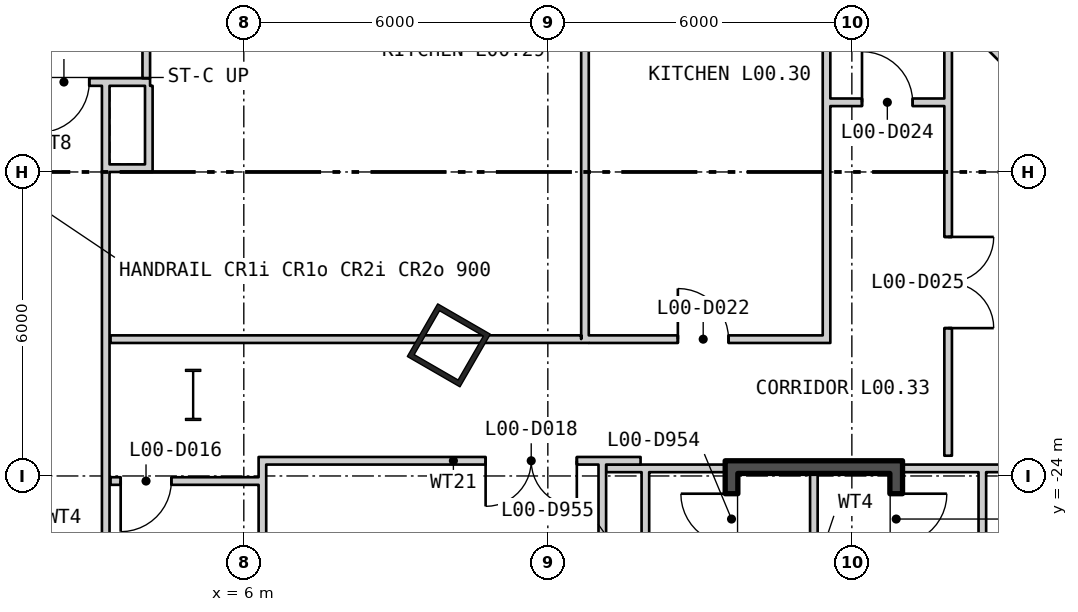
"""IFC4 building model, lengths in metres.
Left out: names, types, materials, properties, quantities, classifications, styles, units other than length and angle.
Written with IfcOpenShell. Run it as: python <this file> out.ifc"""

import sys

from ifc_helpers import new_model, si_unit, direction, frame, frame_2d, origin, origin_2d, place, context, subcontext, project, spatial, rectangle, hollow_rectangle, i_section, extrude, element, fill, save


model = new_model("IFC4")
c1 = context("Model", 3, precision=1e-05, world=origin(), true_north=direction((0.0, 1.0)))
c2 = subcontext(c1, "Body", "Model", "MODEL_VIEW")
j1 = project(units=[si_unit("LENGTHUNIT", "METRE"), si_unit("PLANEANGLEUNIT", "RADIAN")], contexts=[c1])
p1 = place(None, origin())
s1 = spatial("IfcSite", under=j1, at=p1, CompositionType="ELEMENT")
p2 = place(p1, origin())
s2 = spatial("IfcBuilding", under=s1, at=p2, CompositionType="ELEMENT")
p3 = place(p2, origin())
s3 = spatial("IfcBuildingStorey", under=s2, at=p3, CompositionType="ELEMENT", Elevation=0.0)
p4 = place(p3, frame((10.046, -21.422, 0.0), z_axis=(0.0, 0.0, 1.0), x_axis=(0.5, 0.866025403784, 0.0)))
e1 = element("IfcColumn", 1, at=p4, inside=s3, PredefinedType="COLUMN", context=c2, shape_type="SweptSolid", body=[
    extrude(hollow_rectangle(XDim=1.2, YDim=1.2, WallThickness=0.1, at=origin_2d()), origin(), (0.0, 0.0, 1.0), 8.4),
])
p5 = place(p3, frame((5.0, -22.4, 0.0), z_axis=(0.0, 0.0, 1.0), x_axis=(1.0, 0.0, 0.0)))
e2 = element("IfcColumn", 2, at=p5, inside=s3, PredefinedType="COLUMN", context=c2, shape_type="SweptSolid", body=[
    extrude(i_section(OverallWidth=0.302, OverallDepth=1.008, WebThickness=0.021, FlangeThickness=0.04, at=origin_2d()), origin(), (0.0, 0.0, 1.0), 8.4),
])
p6 = place(p3, frame((1.55, -16.225, 0.0), z_axis=(0.0, 0.0, 1.0), x_axis=(1.0, 0.0, 0.0)))
e3 = element("IfcWall", 3, at=p6, inside=s3, PredefinedType="PARTITIONING", context=c2, shape_type="SweptSolid", body=[
    extrude(rectangle(XDim=2.6, YDim=0.15, at=frame_2d((1.3, 0.0))), origin(), (0.0, 0.0, 1.0), 8.18),
])
p7 = place(p6, frame((0.4, 0.0, 0.0)))
e4 = element("IfcOpeningElement", 4, at=p7, cuts=e3, PredefinedType="OPENING", context=c2, shape_type="SweptSolid", body=[
    extrude(rectangle(XDim=1.0, YDim=2.4, at=frame_2d((0.5, 1.2))), frame((0.0, 0.085, 0.0), z_axis=(0.0, -1.0, 0.0), x_axis=(1.0, 0.0, 0.0)), (0.0, 0.0, 1.0), 0.17),
])
p8 = place(p3, frame((4.075, -16.15, 0.0), z_axis=(0.0, 0.0, 1.0), x_axis=(0.0, 1.0, 0.0)))
e5 = element("IfcWall", 5, at=p8, inside=s3, PredefinedType="PARTITIONING", context=c2, shape_type="SweptSolid", body=[
    extrude(rectangle(XDim=2.4, YDim=0.15, at=frame_2d((1.2, 0.0))), origin(), (0.0, 0.0, 1.0), 8.18),
])
p9 = place(p3, frame((3.35, -17.925, 0.0), z_axis=(0.0, 0.0, 1.0), x_axis=(1.0, 0.0, 0.0)))
e6 = element("IfcWall", 6, at=p9, inside=s3, PredefinedType="PARTITIONING", context=c2, shape_type="SweptSolid", body=[
    extrude(rectangle(XDim=0.7, YDim=0.15, at=frame_2d((0.35, 0.0))), origin(), (0.0, 0.0, 1.0), 8.18),
])
p10 = place(p3, frame((4.125, -18.0, 0.0), z_axis=(0.0, 0.0, 1.0), x_axis=(0.0, 1.0, 0.0)))
e7 = element("IfcWall", 7, at=p10, inside=s3, PredefinedType="PARTITIONING", context=c2, shape_type="SweptSolid", body=[
    extrude(rectangle(XDim=1.7, YDim=0.15, at=frame_2d((0.85, 0.0))), origin(), (0.0, 0.0, 1.0), 8.18),
])
p11 = place(p3, frame((3.275, -32.9, 0.0), z_axis=(0.0, 0.0, 1.0), x_axis=(0.0, 1.0, 0.0)))
e8 = element("IfcWall", 8, at=p11, inside=s3, PredefinedType="PARTITIONING", context=c2, shape_type="SweptSolid", body=[
    extrude(rectangle(XDim=16.6, YDim=0.15, at=frame_2d((8.3, 0.0))), origin(), (0.0, 0.0, 1.0), 7.58),
])
p12 = place(p3, frame((15.625, -31.25, 0.0), z_axis=(0.0, 0.0, 1.0), x_axis=(0.0, 1.0, 0.0)))
e9 = element("IfcWall", 9, at=p12, inside=s3, PredefinedType="SHEAR", context=c2, shape_type="SweptSolid", body=[
    extrude(rectangle(XDim=7.3, YDim=0.25, at=frame_2d((3.65, 0.0))), origin(), (0.0, 0.0, 1.0), 8.18),
])
p13 = place(p12, frame((5.9, 0.0, 0.0)))
e10 = element("IfcOpeningElement", 10, at=p13, cuts=e9, PredefinedType="OPENING", context=c2, shape_type="SweptSolid", body=[
    extrude(rectangle(XDim=1.0, YDim=2.1, at=frame_2d((0.5, 1.05))), frame((0.0, 0.135, 0.0), z_axis=(0.0, -1.0, 0.0), x_axis=(1.0, 0.0, 0.0)), (0.0, 0.0, 1.0), 0.27),
])
p14 = place(p3, frame((18.875, -31.25, 0.0), z_axis=(0.0, 0.0, 1.0), x_axis=(0.0, 1.0, 0.0)))
e11 = element("IfcWall", 11, at=p14, inside=s3, PredefinedType="SHEAR", context=c2, shape_type="SweptSolid", body=[
    extrude(rectangle(XDim=7.3, YDim=0.25, at=frame_2d((3.65, 0.0))), origin(), (0.0, 0.0, 1.0), 8.18),
])
p15 = place(p14, frame((5.9, 0.0, 0.0)))
e12 = element("IfcOpeningElement", 12, at=p15, cuts=e11, PredefinedType="OPENING", context=c2, shape_type="SweptSolid", body=[
    extrude(rectangle(XDim=1.0, YDim=2.1, at=frame_2d((0.5, 1.05))), frame((0.0, 0.135, 0.0), z_axis=(0.0, -1.0, 0.0), x_axis=(1.0, 0.0, 0.0)), (0.0, 0.0, 1.0), 0.27),
])
p16 = place(p3, frame((15.5, -23.825, 0.0), z_axis=(0.0, 0.0, 1.0), x_axis=(1.0, 0.0, 0.0)))
e13 = element("IfcWall", 13, at=p16, inside=s3, PredefinedType="SHEAR", context=c2, shape_type="SweptSolid", body=[
    extrude(rectangle(XDim=3.5, YDim=0.25, at=frame_2d((1.75, 0.0))), origin(), (0.0, 0.0, 1.0), 8.18),
])
p17 = place(p3, frame((17.25, -27.97, 0.0), z_axis=(0.0, 0.0, 1.0), x_axis=(0.0, 1.0, 0.0)))
e14 = element("IfcWall", 14, at=p17, inside=s3, PredefinedType="PARTITIONING", context=c2, shape_type="SweptSolid", body=[
    extrude(rectangle(XDim=4.02, YDim=0.15, at=frame_2d((2.01, 0.0))), origin(), (0.0, 0.0, 1.0), 4.0),
])
p18 = place(p3, frame((20.575, -33.35, 0.0), z_axis=(0.0, 0.0, 1.0), x_axis=(0.0, 1.0, 0.0)))
e15 = element("IfcWall", 15, at=p18, inside=s3, PredefinedType="PARTITIONING", context=c2, shape_type="SweptSolid", body=[
    extrude(rectangle(XDim=9.425, YDim=0.15, at=frame_2d((4.713, 0.0))), origin(), (0.0, 0.0, 1.0), 8.18),
])
p19 = place(p3, frame((19.0, -23.85, 0.0), z_axis=(0.0, 0.0, 1.0), x_axis=(1.0, 0.0, 0.0)))
e16 = element("IfcWall", 16, at=p19, inside=s3, PredefinedType="PARTITIONING", context=c2, shape_type="SweptSolid", body=[
    extrude(rectangle(XDim=2.35, YDim=0.15, at=frame_2d((1.175, 0.0))), origin(), (0.0, 0.0, 1.0), 8.18),
])
p20 = place(p3, frame((13.925, -33.35, 0.0), z_axis=(0.0, 0.0, 1.0), x_axis=(0.0, 1.0, 0.0)))
e17 = element("IfcWall", 17, at=p20, inside=s3, PredefinedType="PARTITIONING", context=c2, shape_type="SweptSolid", body=[
    extrude(rectangle(XDim=9.425, YDim=0.15, at=frame_2d((4.713, 0.0))), origin(), (0.0, 0.0, 1.0), 8.18),
])
p21 = place(p3, frame((15.5, -23.85, 0.0), z_axis=(0.0, 0.0, 1.0), x_axis=(-1.0, 0.0, 0.0)))
e18 = element("IfcWall", 18, at=p21, inside=s3, PredefinedType="PARTITIONING", context=c2, shape_type="SweptSolid", body=[
    extrude(rectangle(XDim=2.35, YDim=0.15, at=frame_2d((1.175, 0.0))), origin(), (0.0, 0.0, 1.0), 8.18),
])
p22 = place(p3, frame((13.075, -25.575, 0.0), z_axis=(0.0, 0.0, 1.0), x_axis=(0.0, 1.0, 0.0)))
e19 = element("IfcWall", 19, at=p22, inside=s3, PredefinedType="PARTITIONING", context=c2, shape_type="SweptSolid", body=[
    extrude(rectangle(XDim=1.8, YDim=0.15, at=frame_2d((0.9, 0.0))), origin(), (0.0, 0.0, 1.0), 8.18),
])
p23 = place(p3, frame((3.37, -24.1, 0.0), z_axis=(0.0, 0.0, 1.0), x_axis=(1.0, 0.0, 0.0)))
e20 = element("IfcWall", 20, at=p23, inside=s3, PredefinedType="PARTITIONING", context=c2, shape_type="SweptSolid", body=[
    extrude(rectangle(XDim=2.922, YDim=0.15, at=frame_2d((1.461, 0.0))), origin(), (0.0, 0.0, 1.0), 8.18),
])
p24 = place(p23, frame((0.2, 0.0, 0.0)))
e21 = element("IfcOpeningElement", 21, at=p24, cuts=e20, PredefinedType="OPENING", context=c2, shape_type="SweptSolid", body=[
    extrude(rectangle(XDim=1.0, YDim=2.1, at=frame_2d((0.5, 1.05))), frame((0.0, 0.085, 0.0), z_axis=(0.0, -1.0, 0.0), x_axis=(1.0, 0.0, 0.0)), (0.0, 0.0, 1.0), 0.17),
])
p25 = place(p3, frame((3.37, -21.3, 0.0), z_axis=(0.0, 0.0, 1.0), x_axis=(0.999999994204, 0.000107665805, 0.0)))
e22 = element("IfcWall", 22, at=p25, inside=s3, PredefinedType="PARTITIONING", context=c2, shape_type="SweptSolid", body=[
    extrude(rectangle(XDim=9.288, YDim=0.15, at=frame_2d((4.644, 0.0))), origin(), (0.0, 0.0, 1.0), 8.18),
])
p26 = place(p3, frame((6.367, -27.386, 0.0), z_axis=(0.0, 0.0, 1.0), x_axis=(0.0, 1.0, 0.0)))
e23 = element("IfcWall", 23, at=p26, inside=s3, PredefinedType="PARTITIONING", context=c2, shape_type="SweptSolid", body=[
    extrude(rectangle(XDim=3.761, YDim=0.15, at=frame_2d((1.881, 0.0))), origin(), (0.0, 0.0, 1.0), 7.58),
])
p27 = place(p3, frame((6.442, -23.7, 0.0), z_axis=(0.0, 0.0, 1.0), x_axis=(1.0, 0.0, 0.0)))
e24 = element("IfcWall", 24, at=p27, inside=s3, PredefinedType="PARTITIONING", context=c2, shape_type="SweptSolid", body=[
    extrude(rectangle(XDim=7.388, YDim=0.15, at=frame_2d((3.694, 0.0))), origin(), (0.0, 0.0, 1.0), 8.18),
])
p28 = place(p27, frame((4.33, 0.0, 0.0)))
e25 = element("IfcOpeningElement", 25, at=p28, cuts=e24, PredefinedType="OPENING", context=c2, shape_type="SweptSolid", body=[
    extrude(rectangle(XDim=1.8, YDim=2.1, at=frame_2d((0.9, 1.05))), frame((0.0, 0.085, 0.0), z_axis=(0.0, -1.0, 0.0), x_axis=(1.0, 0.0, 0.0)), (0.0, 0.0, 1.0), 0.17),
])
p29 = place(p3, frame((12.733, -21.374, 0.0), z_axis=(0.0, 0.0, 1.0), x_axis=(0.0, 1.0, 0.0)))
e26 = element("IfcWall", 26, at=p29, inside=s3, PredefinedType="PARTITIONING", context=c2, shape_type="SweptSolid", body=[
    extrude(rectangle(XDim=1.575, YDim=0.15, at=frame_2d((0.787, 0.0))), origin(), (0.0, 0.0, 1.0), 7.49),
])
p30 = place(p3, frame((12.733, -19.799, 0.0), z_axis=(0.0, 0.0, 1.0), x_axis=(0.0, 1.0, 0.0)))
e27 = element("IfcWall", 27, at=p30, inside=s3, PredefinedType="PARTITIONING", context=c2, shape_type="SweptSolid", body=[
    extrude(rectangle(XDim=2.832, YDim=0.15, at=frame_2d((1.416, 0.0))), origin(), (0.0, 0.0, 1.0), 7.58),
])
p31 = place(p3, frame((12.733, -16.967, 0.0), z_axis=(0.0, 0.0, 1.0), x_axis=(0.0, 1.0, 0.0)))
e28 = element("IfcWall", 28, at=p31, inside=s3, PredefinedType="PARTITIONING", context=c2, shape_type="SweptSolid", body=[
    extrude(rectangle(XDim=0.4, YDim=0.15, at=frame_2d((0.2, 0.0))), origin(), (0.0, 0.0, 1.0), 8.18),
])
p32 = place(p3, frame((12.733, -16.567, 0.0), z_axis=(0.0, 0.0, 1.0), x_axis=(0.0, 1.0, 0.0)))
e29 = element("IfcWall", 29, at=p32, inside=s3, PredefinedType="PARTITIONING", context=c2, shape_type="SweptSolid", body=[
    extrude(rectangle(XDim=2.717, YDim=0.15, at=frame_2d((1.359, 0.0))), origin(), (0.0, 0.0, 1.0), 7.58),
])
p33 = place(p3, frame((12.808, -21.3, 0.0), z_axis=(0.0, 0.0, 1.0), x_axis=(1.0, 0.0, 0.0)))
e30 = element("IfcWall", 30, at=p33, inside=s3, PredefinedType="PARTITIONING", context=c2, shape_type="SweptSolid", body=[
    extrude(rectangle(XDim=4.617, YDim=0.15, at=frame_2d((2.308, 0.0))), origin(), (0.0, 0.0, 1.0), 8.18),
])
p34 = place(p33, frame((1.758, 0.0, 0.0)))
e31 = element("IfcOpeningElement", 31, at=p34, cuts=e30, PredefinedType="OPENING", context=c2, shape_type="SweptSolid", body=[
    extrude(rectangle(XDim=1.0, YDim=2.1, at=frame_2d((0.5, 1.05))), frame((0.0, 0.085, 0.0), z_axis=(0.0, -1.0, 0.0), x_axis=(1.0, 0.0, 0.0)), (0.0, 0.0, 1.0), 0.17),
])
p35 = place(p3, frame((17.5, -21.375, 0.0), z_axis=(0.0, 0.0, 1.0), x_axis=(0.0, 1.0, 0.0)))
e32 = element("IfcWall", 32, at=p35, inside=s3, PredefinedType="PARTITIONING", context=c2, shape_type="SweptSolid", body=[
    extrude(rectangle(XDim=9.15, YDim=0.15, at=frame_2d((4.575, 0.0))), origin(), (0.0, 0.0, 1.0), 8.18),
])
p36 = place(p3, frame((17.575, -16.625, 0.0), z_axis=(0.0, 0.0, 1.0), x_axis=(1.0, 0.0, 0.0)))
e33 = element("IfcWall", 33, at=p36, inside=s3, PredefinedType="PARTITIONING", context=c2, shape_type="SweptSolid", body=[
    extrude(rectangle(XDim=2.25, YDim=0.15, at=frame_2d((1.125, 0.0))), origin(), (0.0, 0.0, 1.0), 8.18),
])
p37 = place(p36, frame((0.625, 0.0, 0.0)))
e34 = element("IfcOpeningElement", 34, at=p37, cuts=e33, PredefinedType="OPENING", context=c2, shape_type="SweptSolid", body=[
    extrude(rectangle(XDim=1.0, YDim=2.1, at=frame_2d((0.5, 1.05))), frame((0.0, 0.085, 0.0), z_axis=(0.0, -1.0, 0.0), x_axis=(1.0, 0.0, 0.0)), (0.0, 0.0, 1.0), 0.17),
])
p38 = place(p3, frame((19.9, -23.6, 0.0), z_axis=(0.0, 0.0, 1.0), x_axis=(0.0, 1.0, 0.0)))
e35 = element("IfcWall", 35, at=p38, inside=s3, PredefinedType="PARTITIONING", context=c2, shape_type="SweptSolid", body=[
    extrude(rectangle(XDim=21.012, YDim=0.15, at=frame_2d((10.506, 0.0))), origin(), (0.0, 0.0, 1.0), 8.18),
])
p39 = place(p38, frame((2.518, 0.0, 0.0)))
e36 = element("IfcOpeningElement", 36, at=p39, cuts=e35, PredefinedType="OPENING", context=c2, shape_type="SweptSolid", body=[
    extrude(rectangle(XDim=1.8, YDim=2.1, at=frame_2d((0.9, 1.05))), frame((0.0, 0.085, 0.0), z_axis=(0.0, -1.0, 0.0), x_axis=(1.0, 0.0, 0.0)), (0.0, 0.0, 1.0), 0.17),
])
p40 = place(p38, frame((11.823, 0.0, 0.0)))
e37 = element("IfcOpeningElement", 37, at=p40, cuts=e35, PredefinedType="OPENING", context=c2, shape_type="SweptSolid", body=[
    extrude(rectangle(XDim=1.8, YDim=2.1, at=frame_2d((0.9, 1.05))), frame((0.0, 0.085, 0.0), z_axis=(0.0, -1.0, 0.0), x_axis=(1.0, 0.0, 0.0)), (0.0, 0.0, 1.0), 0.17),
])
p41 = place(p3, frame((20.028, -14.827, 0.0), z_axis=(0.0, 0.0, 1.0), x_axis=(0.707106781187, -0.707106781187, 0.0)))
e38 = element("IfcWall", 38, at=p41, inside=s3, PredefinedType="PARTITIONING", context=c2, shape_type="SweptSolid", body=[
    extrude(rectangle(XDim=7.068, YDim=0.15, at=frame_2d((3.534, 0.0))), origin(), (0.0, 0.0, 1.0), 8.18),
])
p42 = place(p7, origin())
e39 = element("IfcDoor", 39, at=p42, inside=s3, OperationType="SINGLE_SWING_LEFT", PredefinedType="DOOR", context=c2, shape_type="SweptSolid", body=[
    extrude(rectangle(XDim=1.0, YDim=2.4, at=frame_2d((0.5, 1.2))), frame((0.0, 0.025, 0.0), z_axis=(0.0, -1.0, 0.0), x_axis=(1.0, 0.0, 0.0)), (0.0, 0.0, 1.0), 0.05),
])
fill(e4, e39)
p43 = place(p15, origin())
e40 = element("IfcDoor", 40, at=p43, inside=s3, OperationType="SINGLE_SWING_RIGHT", PredefinedType="DOOR", context=c2, shape_type="SweptSolid", body=[
    extrude(rectangle(XDim=1.0, YDim=2.1, at=frame_2d((0.5, 1.05))), frame((0.0, 0.025, 0.0), z_axis=(0.0, -1.0, 0.0), x_axis=(1.0, 0.0, 0.0)), (0.0, 0.0, 1.0), 0.05),
])
fill(e12, e40)
p44 = place(p13, origin())
e41 = element("IfcDoor", 41, at=p44, inside=s3, OperationType="SINGLE_SWING_LEFT", PredefinedType="DOOR", context=c2, shape_type="SweptSolid", body=[
    extrude(rectangle(XDim=1.0, YDim=2.1, at=frame_2d((0.5, 1.05))), frame((0.0, 0.025, 0.0), z_axis=(0.0, -1.0, 0.0), x_axis=(1.0, 0.0, 0.0)), (0.0, 0.0, 1.0), 0.05),
])
fill(e10, e41)
p45 = place(p24, origin())
e42 = element("IfcDoor", 42, at=p45, inside=s3, OperationType="SINGLE_SWING_LEFT", PredefinedType="DOOR", context=c2, shape_type="SweptSolid", body=[
    extrude(rectangle(XDim=1.0, YDim=2.1, at=frame_2d((0.5, 1.05))), frame((0.0, 0.025, 0.0), z_axis=(0.0, -1.0, 0.0), x_axis=(1.0, 0.0, 0.0)), (0.0, 0.0, 1.0), 0.05),
])
fill(e21, e42)
p46 = place(p28, origin())
e43 = element("IfcDoor", 43, at=p46, inside=s3, OperationType="DOUBLE_DOOR_SINGLE_SWING", PredefinedType="DOOR", context=c2, shape_type="SweptSolid", body=[
    extrude(rectangle(XDim=1.8, YDim=2.1, at=frame_2d((0.9, 1.05))), frame((0.0, 0.025, 0.0), z_axis=(0.0, -1.0, 0.0), x_axis=(1.0, 0.0, 0.0)), (0.0, 0.0, 1.0), 0.05),
])
fill(e25, e43)
p47 = place(p34, origin())
e44 = element("IfcDoor", 44, at=p47, inside=s3, OperationType="SINGLE_SWING_RIGHT", PredefinedType="DOOR", context=c2, shape_type="SweptSolid", body=[
    extrude(rectangle(XDim=1.0, YDim=2.1, at=frame_2d((0.5, 1.05))), frame((0.0, 0.025, 0.0), z_axis=(0.0, -1.0, 0.0), x_axis=(1.0, 0.0, 0.0)), (0.0, 0.0, 1.0), 0.05),
])
fill(e31, e44)
p48 = place(p37, origin())
e45 = element("IfcDoor", 45, at=p48, inside=s3, OperationType="SINGLE_SWING_RIGHT", PredefinedType="DOOR", context=c2, shape_type="SweptSolid", body=[
    extrude(rectangle(XDim=1.0, YDim=2.1, at=frame_2d((0.5, 1.05))), frame((0.0, 0.025, 0.0), z_axis=(0.0, -1.0, 0.0), x_axis=(1.0, 0.0, 0.0)), (0.0, 0.0, 1.0), 0.05),
])
fill(e34, e45)
p49 = place(p39, origin())
e46 = element("IfcDoor", 46, at=p49, inside=s3, OperationType="DOUBLE_DOOR_SINGLE_SWING", PredefinedType="DOOR", context=c2, shape_type="SweptSolid", body=[
    extrude(rectangle(XDim=1.8, YDim=2.1, at=frame_2d((0.9, 1.05))), frame((0.0, 0.025, 0.0), z_axis=(0.0, -1.0, 0.0), x_axis=(1.0, 0.0, 0.0)), (0.0, 0.0, 1.0), 0.05),
])
fill(e36, e46)
save(model, sys.argv[1])
